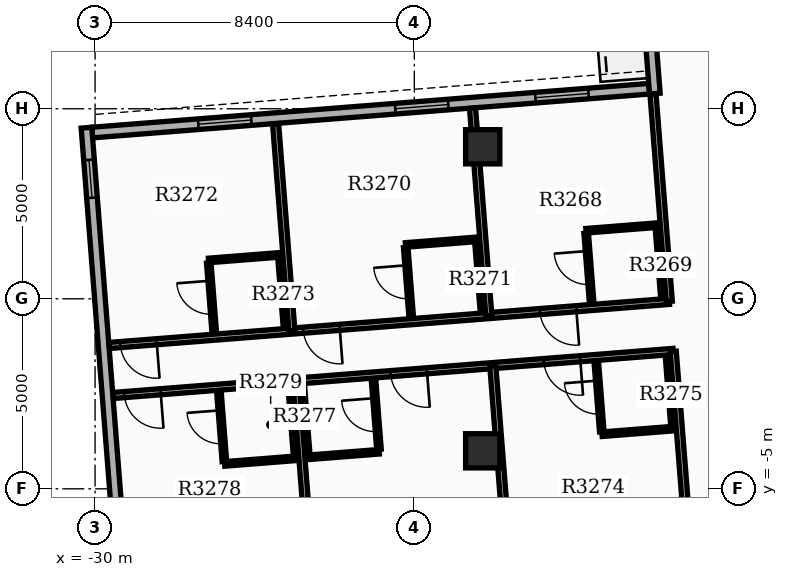
"""IFC4 building model, lengths in metres.
Left out: names, types, materials, properties, quantities, classifications, styles, units other than length and angle.
Written with IfcOpenShell. Run it as: python <this file> out.ifc"""

import sys

from ifc_helpers import new_model, si_unit, direction, frame, frame_2d, origin, origin_2d, place, context, subcontext, project, spatial, rectangle, extrude, element, fill, save


model = new_model("IFC4")
c1 = context("Model", 3, precision=1e-05, world=origin(), true_north=direction((0.0, 1.0)))
c2 = subcontext(c1, "Body", "Model", "MODEL_VIEW")
j1 = project(units=[si_unit("LENGTHUNIT", "METRE"), si_unit("PLANEANGLEUNIT", "RADIAN")], contexts=[c1])
p1 = place(None, origin())
s1 = spatial("IfcSite", under=j1, at=p1, CompositionType="ELEMENT")
p2 = place(p1, origin())
s2 = spatial("IfcBuilding", under=s1, at=p2, CompositionType="ELEMENT")
p3 = place(p2, frame((0.0, 0.0, 205.2)))
s3 = spatial("IfcBuildingStorey", under=s2, at=p3, CompositionType="ELEMENT", Elevation=205.2)
for number, where, z_axis, x_axis in (
    (1, (-19.8, -4.0, 0.0), (0.0, 0.0, 1.0), (1.0, 0.0, 0.0)),
    (2, (-19.8, 4.0, 0.0), (0.0, 0.0, 1.0), (1.0, 0.0, 0.0)),
):
    element("IfcColumn", number, at=place(p3, frame(where, z_axis=z_axis, x_axis=x_axis)), inside=s3, PredefinedType="COLUMN", context=c2, shape_type="SweptSolid", body=[
        extrude(rectangle(XDim=0.9, YDim=0.9, at=origin_2d()), origin(), (0.0, 0.0, 1.0), 3.9),
    ])
p4 = place(p3, frame((-15.421, 5.527, 0.0), z_axis=(0.0, 0.0, 1.0), x_axis=(-0.996917526837, -0.078456642068, 0.0)))
e3 = element("IfcWall", 3, at=p4, inside=s3, PredefinedType="STANDARD", context=c2, shape_type="SweptSolid", body=[
    extrude(rectangle(XDim=14.7, YDim=0.28, at=frame_2d((7.35, 0.0))), origin(), (0.0, 0.0, 1.0), 3.18),
])
p5 = place(p4, frame((1.6, 0.0, 0.8)))
e4 = element("IfcOpeningElement", 4, at=p5, cuts=e3, PredefinedType="OPENING", context=c2, shape_type="SweptSolid", body=[
    extrude(rectangle(XDim=1.4, YDim=1.6, at=frame_2d((0.7, 0.8))), frame((0.0, 0.15, 0.0), z_axis=(0.0, -1.0, 0.0), x_axis=(1.0, 0.0, 0.0)), (0.0, 0.0, 1.0), 0.3),
])
p6 = place(p4, frame((5.3, 0.0, 0.8)))
e5 = element("IfcOpeningElement", 5, at=p6, cuts=e3, PredefinedType="OPENING", context=c2, shape_type="SweptSolid", body=[
    extrude(rectangle(XDim=1.4, YDim=1.6, at=frame_2d((0.7, 0.8))), frame((0.0, 0.15, 0.0), z_axis=(0.0, -1.0, 0.0), x_axis=(1.0, 0.0, 0.0)), (0.0, 0.0, 1.0), 0.3),
])
p7 = place(p4, frame((10.5, 0.0, 0.8)))
e6 = element("IfcOpeningElement", 6, at=p7, cuts=e3, PredefinedType="OPENING", context=c2, shape_type="SweptSolid", body=[
    extrude(rectangle(XDim=1.4, YDim=1.6, at=frame_2d((0.7, 0.8))), frame((0.0, 0.15, 0.0), z_axis=(0.0, -1.0, 0.0), x_axis=(1.0, 0.0, 0.0)), (0.0, 0.0, 1.0), 0.3),
])
p8 = place(p3, frame((-30.226, 4.502, 0.0), z_axis=(0.0, 0.0, 1.0), x_axis=(0.078457226018, -0.996917480881, 0.0)))
e7 = element("IfcWall", 7, at=p8, inside=s3, PredefinedType="STANDARD", context=c2, shape_type="SweptSolid", body=[
    extrude(rectangle(XDim=13.72, YDim=0.28, at=frame_2d((6.86, 0.0))), origin(), (0.0, 0.0, 1.0), 3.18),
])
p9 = place(p8, frame((0.85, 0.0, 0.85)))
e8 = element("IfcOpeningElement", 8, at=p9, cuts=e7, PredefinedType="OPENING", context=c2, shape_type="SweptSolid", body=[
    extrude(rectangle(XDim=1.0, YDim=1.5, at=frame_2d((0.5, 0.75))), frame((0.0, 0.15, 0.0), z_axis=(0.0, -1.0, 0.0), x_axis=(1.0, 0.0, 0.0)), (0.0, 0.0, 1.0), 0.3),
])
p10 = place(p3, frame((-15.271, 5.398, 0.0), z_axis=(0.0, 0.0, 1.0), x_axis=(-0.078473519122, 0.996916198482, 0.0)))
e9 = element("IfcWall", 9, at=p10, inside=s3, PredefinedType="STANDARD", context=c2, shape_type="SweptSolid", body=[
    extrude(rectangle(XDim=6.86, YDim=0.28, at=frame_2d((3.43, 0.0))), origin(), (0.0, 0.0, 1.0), 3.18),
])
p11 = place(p3, frame((-14.89, -0.069, 0.0), z_axis=(0.0, 0.0, 1.0), x_axis=(-0.996917997344, -0.078450663299, 0.0)))
e10 = element("IfcWall", 10, at=p11, inside=s3, PredefinedType="PARTITIONING", context=c2, shape_type="SweptSolid", body=[
    extrude(rectangle(XDim=14.782, YDim=0.16, at=frame_2d((7.391, 0.0))), origin(), (0.0, 0.0, 1.0), 3.17),
])
p12 = place(p11, frame((2.456, 0.0, 0.0)))
e11 = element("IfcOpeningElement", 11, at=p12, cuts=e10, PredefinedType="OPENING", context=c2, shape_type="SweptSolid", body=[
    extrude(rectangle(XDim=0.96, YDim=2.15, at=frame_2d((0.48, 1.075))), frame((0.0, 0.09, 0.0), z_axis=(0.0, -1.0, 0.0), x_axis=(1.0, 0.0, 0.0)), (0.0, 0.0, 1.0), 0.18),
])
p13 = place(p11, frame((8.701, 0.0, 0.0)))
e12 = element("IfcOpeningElement", 12, at=p13, cuts=e10, PredefinedType="OPENING", context=c2, shape_type="SweptSolid", body=[
    extrude(rectangle(XDim=0.96, YDim=2.15, at=frame_2d((0.48, 1.075))), frame((0.0, 0.09, 0.0), z_axis=(0.0, -1.0, 0.0), x_axis=(1.0, 0.0, 0.0)), (0.0, 0.0, 1.0), 0.18),
])
p14 = place(p11, frame((13.53, 0.0, 0.0)))
e13 = element("IfcOpeningElement", 13, at=p14, cuts=e10, PredefinedType="OPENING", context=c2, shape_type="SweptSolid", body=[
    extrude(rectangle(XDim=0.96, YDim=2.15, at=frame_2d((0.48, 1.075))), frame((0.0, 0.09, 0.0), z_axis=(0.0, -1.0, 0.0), x_axis=(1.0, 0.0, 0.0)), (0.0, 0.0, 1.0), 0.18),
])
p15 = place(p3, frame((-14.89, -0.069, 0.0), z_axis=(0.0, 0.0, 1.0), x_axis=(-0.078477291154, 0.996915901555, 0.0)))
e14 = element("IfcWall", 14, at=p15, inside=s3, PredefinedType="PARTITIONING", context=c2, shape_type="SweptSolid", body=[
    extrude(rectangle(XDim=5.472, YDim=0.16, at=frame_2d((2.736, 0.0))), origin(), (0.0, 0.0, 1.0), 3.17),
])
p16 = place(p3, frame((-19.639, -0.442, 0.0), z_axis=(0.0, 0.0, 1.0), x_axis=(-0.078436439621, 0.996919116548, 0.0)))
e15 = element("IfcWall", 15, at=p16, inside=s3, PredefinedType="PARTITIONING", context=c2, shape_type="SweptSolid", body=[
    extrude(rectangle(XDim=5.472, YDim=0.16, at=frame_2d((2.736, 0.0))), origin(), (0.0, 0.0, 1.0), 3.17),
])
p17 = place(p3, frame((-16.935, -0.089, 0.0), z_axis=(0.0, 0.0, 1.0), x_axis=(-0.078337634704, 0.996926885478, 0.0)))
e16 = element("IfcWall", 16, at=p17, inside=s3, PredefinedType="PARTITIONING", context=c2, shape_type="SweptSolid", body=[
    extrude(rectangle(XDim=1.82, YDim=0.12, at=frame_2d((0.91, 0.0))), origin(), (0.0, 0.0, 1.0), 3.17),
])
p18 = place(p17, frame((0.47, 0.0, 0.0)))
e17 = element("IfcOpeningElement", 17, at=p18, cuts=e16, PredefinedType="OPENING", context=c2, shape_type="SweptSolid", body=[
    extrude(rectangle(XDim=0.88, YDim=2.1, at=frame_2d((0.44, 1.05))), frame((0.0, 0.07, 0.0), z_axis=(0.0, -1.0, 0.0), x_axis=(1.0, 0.0, 0.0)), (0.0, 0.0, 1.0), 0.14),
])
p19 = place(p3, frame((-15.061, 0.059, 0.0), z_axis=(0.0, 0.0, 1.0), x_axis=(-0.078481444107, 0.996915574626, 0.0)))
e18 = element("IfcWall", 18, at=p19, inside=s3, PredefinedType="PARTITIONING", context=c2, shape_type="SweptSolid", body=[
    extrude(rectangle(XDim=1.82, YDim=0.12, at=frame_2d((0.91, 0.0))), origin(), (0.0, 0.0, 1.0), 3.17),
])
p20 = place(p3, frame((-15.209, 1.938, 0.0), z_axis=(0.0, 0.0, 1.0), x_axis=(-0.99691849475, -0.078444342213, 0.0)))
e19 = element("IfcWall", 19, at=p20, inside=s3, PredefinedType="PARTITIONING", context=c2, shape_type="SweptSolid", body=[
    extrude(rectangle(XDim=1.88, YDim=0.12, at=frame_2d((0.94, 0.0))), origin(), (0.0, 0.0, 1.0), 3.17),
])
p21 = place(p3, frame((-24.821, -0.85, 0.0), z_axis=(0.0, 0.0, 1.0), x_axis=(-0.078480781753, 0.996915626769, 0.0)))
e20 = element("IfcWall", 20, at=p21, inside=s3, PredefinedType="PARTITIONING", context=c2, shape_type="SweptSolid", body=[
    extrude(rectangle(XDim=5.472, YDim=0.16, at=frame_2d((2.736, 0.0))), origin(), (0.0, 0.0, 1.0), 3.17),
])
p22 = place(p3, frame((-21.684, -0.463, 0.0), z_axis=(0.0, 0.0, 1.0), x_axis=(-0.0784709492, 0.996916400774, 0.0)))
e21 = element("IfcWall", 21, at=p22, inside=s3, PredefinedType="PARTITIONING", context=c2, shape_type="SweptSolid", body=[
    extrude(rectangle(XDim=1.82, YDim=0.12, at=frame_2d((0.91, 0.0))), origin(), (0.0, 0.0, 1.0), 3.17),
])
p23 = place(p22, frame((0.47, 0.0, 0.0)))
e22 = element("IfcOpeningElement", 22, at=p23, cuts=e21, PredefinedType="OPENING", context=c2, shape_type="SweptSolid", body=[
    extrude(rectangle(XDim=0.88, YDim=2.1, at=frame_2d((0.44, 1.05))), frame((0.0, 0.07, 0.0), z_axis=(0.0, -1.0, 0.0), x_axis=(1.0, 0.0, 0.0)), (0.0, 0.0, 1.0), 0.14),
])
p24 = place(p3, frame((-19.809, -0.315, 0.0), z_axis=(0.0, 0.0, 1.0), x_axis=(-0.0784709492, 0.996916400774, 0.0)))
e23 = element("IfcWall", 23, at=p24, inside=s3, PredefinedType="PARTITIONING", context=c2, shape_type="SweptSolid", body=[
    extrude(rectangle(XDim=1.82, YDim=0.12, at=frame_2d((0.91, 0.0))), origin(), (0.0, 0.0, 1.0), 3.17),
])
p25 = place(p3, frame((-19.957, 1.564, 0.0), z_axis=(0.0, 0.0, 1.0), x_axis=(-0.99691849475, -0.078444342213, 0.0)))
e24 = element("IfcWall", 24, at=p25, inside=s3, PredefinedType="PARTITIONING", context=c2, shape_type="SweptSolid", body=[
    extrude(rectangle(XDim=1.88, YDim=0.12, at=frame_2d((0.94, 0.0))), origin(), (0.0, 0.0, 1.0), 3.17),
])
p26 = place(p3, frame((-26.865, -0.871, 0.0), z_axis=(0.0, 0.0, 1.0), x_axis=(-0.0784709492, 0.996916400774, 0.0)))
e25 = element("IfcWall", 25, at=p26, inside=s3, PredefinedType="PARTITIONING", context=c2, shape_type="SweptSolid", body=[
    extrude(rectangle(XDim=1.82, YDim=0.12, at=frame_2d((0.91, 0.0))), origin(), (0.0, 0.0, 1.0), 3.17),
])
p27 = place(p26, frame((0.47, 0.0, 0.0)))
e26 = element("IfcOpeningElement", 26, at=p27, cuts=e25, PredefinedType="OPENING", context=c2, shape_type="SweptSolid", body=[
    extrude(rectangle(XDim=0.88, YDim=2.1, at=frame_2d((0.44, 1.05))), frame((0.0, 0.07, 0.0), z_axis=(0.0, -1.0, 0.0), x_axis=(1.0, 0.0, 0.0)), (0.0, 0.0, 1.0), 0.14),
])
p28 = place(p3, frame((-24.991, -0.723, 0.0), z_axis=(0.0, 0.0, 1.0), x_axis=(-0.078481444107, 0.996915574626, 0.0)))
e27 = element("IfcWall", 27, at=p28, inside=s3, PredefinedType="PARTITIONING", context=c2, shape_type="SweptSolid", body=[
    extrude(rectangle(XDim=1.82, YDim=0.12, at=frame_2d((0.91, 0.0))), origin(), (0.0, 0.0, 1.0), 3.17),
])
p29 = place(p3, frame((-25.139, 1.156, 0.0), z_axis=(0.0, 0.0, 1.0), x_axis=(-0.996919293781, -0.07843418698, 0.0)))
e28 = element("IfcWall", 28, at=p29, inside=s3, PredefinedType="PARTITIONING", context=c2, shape_type="SweptSolid", body=[
    extrude(rectangle(XDim=1.88, YDim=0.12, at=frame_2d((0.94, 0.0))), origin(), (0.0, 0.0, 1.0), 3.17),
])
p30 = place(p3, frame((-14.787, -1.385, 0.0), z_axis=(0.0, 0.0, 1.0), x_axis=(-0.996917895694, -0.078451955012, 0.0)))
e29 = element("IfcWall", 29, at=p30, inside=s3, PredefinedType="PARTITIONING", context=c2, shape_type="SweptSolid", body=[
    extrude(rectangle(XDim=14.782, YDim=0.16, at=frame_2d((7.391, 0.0))), origin(), (0.0, 0.0, 1.0), 3.17),
])
p31 = place(p30, frame((2.456, 0.0, 0.0)))
e30 = element("IfcOpeningElement", 30, at=p31, cuts=e29, PredefinedType="OPENING", context=c2, shape_type="SweptSolid", body=[
    extrude(rectangle(XDim=0.96, YDim=2.15, at=frame_2d((0.48, 1.075))), frame((0.0, 0.09, 0.0), z_axis=(0.0, -1.0, 0.0), x_axis=(1.0, 0.0, 0.0)), (0.0, 0.0, 1.0), 0.18),
])
p32 = place(p30, frame((6.501, 0.0, 0.0)))
e31 = element("IfcOpeningElement", 31, at=p32, cuts=e29, PredefinedType="OPENING", context=c2, shape_type="SweptSolid", body=[
    extrude(rectangle(XDim=0.96, YDim=2.15, at=frame_2d((0.48, 1.075))), frame((0.0, 0.09, 0.0), z_axis=(0.0, -1.0, 0.0), x_axis=(1.0, 0.0, 0.0)), (0.0, 0.0, 1.0), 0.18),
])
p33 = place(p30, frame((13.53, 0.0, 0.0)))
e32 = element("IfcOpeningElement", 32, at=p33, cuts=e29, PredefinedType="OPENING", context=c2, shape_type="SweptSolid", body=[
    extrude(rectangle(XDim=0.96, YDim=2.15, at=frame_2d((0.48, 1.075))), frame((0.0, 0.09, 0.0), z_axis=(0.0, -1.0, 0.0), x_axis=(1.0, 0.0, 0.0)), (0.0, 0.0, 1.0), 0.18),
])
p34 = place(p3, frame((-14.787, -1.385, 0.0), z_axis=(0.0, 0.0, 1.0), x_axis=(0.078486363594, -0.99691518733, 0.0)))
e33 = element("IfcWall", 33, at=p34, inside=s3, PredefinedType="PARTITIONING", context=c2, shape_type="SweptSolid", body=[
    extrude(rectangle(XDim=6.352, YDim=0.16, at=frame_2d((3.176, 0.0))), origin(), (0.0, 0.0, 1.0), 3.17),
])
p35 = place(p3, frame((-19.535, -1.758, 0.0), z_axis=(0.0, 0.0, 1.0), x_axis=(0.078483356311, -0.996915424087, 0.0)))
e34 = element("IfcWall", 34, at=p35, inside=s3, PredefinedType="PARTITIONING", context=c2, shape_type="SweptSolid", body=[
    extrude(rectangle(XDim=6.352, YDim=0.16, at=frame_2d((3.176, 0.0))), origin(), (0.0, 0.0, 1.0), 3.17),
])
p36 = place(p3, frame((-16.667, -3.499, 0.0), z_axis=(0.0, 0.0, 1.0), x_axis=(-0.0784709492, 0.996916400774, 0.0)))
e35 = element("IfcWall", 35, at=p36, inside=s3, PredefinedType="PARTITIONING", context=c2, shape_type="SweptSolid", body=[
    extrude(rectangle(XDim=1.82, YDim=0.12, at=frame_2d((0.91, 0.0))), origin(), (0.0, 0.0, 1.0), 3.17),
])
p37 = place(p36, frame((0.47, 0.0, 0.0)))
e36 = element("IfcOpeningElement", 36, at=p37, cuts=e35, PredefinedType="OPENING", context=c2, shape_type="SweptSolid", body=[
    extrude(rectangle(XDim=0.88, YDim=2.1, at=frame_2d((0.44, 1.05))), frame((0.0, 0.07, 0.0), z_axis=(0.0, -1.0, 0.0), x_axis=(1.0, 0.0, 0.0)), (0.0, 0.0, 1.0), 0.14),
])
p38 = place(p3, frame((-14.793, -3.351, 0.0), z_axis=(0.0, 0.0, 1.0), x_axis=(-0.0784709492, 0.996916400774, 0.0)))
e37 = element("IfcWall", 37, at=p38, inside=s3, PredefinedType="PARTITIONING", context=c2, shape_type="SweptSolid", body=[
    extrude(rectangle(XDim=1.82, YDim=0.12, at=frame_2d((0.91, 0.0))), origin(), (0.0, 0.0, 1.0), 3.17),
])
p39 = place(p3, frame((-14.788, -3.416, 0.0), z_axis=(0.0, 0.0, 1.0), x_axis=(-0.996919293781, -0.07843418698, 0.0)))
e38 = element("IfcWall", 38, at=p39, inside=s3, PredefinedType="PARTITIONING", context=c2, shape_type="SweptSolid", body=[
    extrude(rectangle(XDim=1.88, YDim=0.12, at=frame_2d((0.94, 0.0))), origin(), (0.0, 0.0, 1.0), 3.17),
])
p40 = place(p3, frame((-24.717, -2.166, 0.0), z_axis=(0.0, 0.0, 1.0), x_axis=(0.078448164166, -0.996918194005, 0.0)))
e39 = element("IfcWall", 39, at=p40, inside=s3, PredefinedType="PARTITIONING", context=c2, shape_type="SweptSolid", body=[
    extrude(rectangle(XDim=6.352, YDim=0.16, at=frame_2d((3.176, 0.0))), origin(), (0.0, 0.0, 1.0), 3.17),
])
p41 = place(p3, frame((-22.53, -3.96, 0.0), z_axis=(0.0, 0.0, 1.0), x_axis=(-0.0784709492, 0.996916400774, 0.0)))
e40 = element("IfcWall", 40, at=p41, inside=s3, PredefinedType="PARTITIONING", context=c2, shape_type="SweptSolid", body=[
    extrude(rectangle(XDim=1.82, YDim=0.12, at=frame_2d((0.91, 0.0))), origin(), (0.0, 0.0, 1.0), 3.17),
])
p42 = place(p41, frame((0.47, 0.0, 0.0)))
e41 = element("IfcOpeningElement", 41, at=p42, cuts=e40, PredefinedType="OPENING", context=c2, shape_type="SweptSolid", body=[
    extrude(rectangle(XDim=0.88, YDim=2.1, at=frame_2d((0.44, 1.05))), frame((0.0, 0.07, 0.0), z_axis=(0.0, -1.0, 0.0), x_axis=(1.0, 0.0, 0.0)), (0.0, 0.0, 1.0), 0.14),
])
p43 = place(p3, frame((-24.404, -4.107, 0.0), z_axis=(0.0, 0.0, 1.0), x_axis=(-0.0784709492, 0.996916400774, 0.0)))
e42 = element("IfcWall", 42, at=p43, inside=s3, PredefinedType="PARTITIONING", context=c2, shape_type="SweptSolid", body=[
    extrude(rectangle(XDim=1.82, YDim=0.12, at=frame_2d((0.91, 0.0))), origin(), (0.0, 0.0, 1.0), 3.17),
])
p44 = place(p3, frame((-22.525, -4.025, 0.0), z_axis=(0.0, 0.0, 1.0), x_axis=(-0.996919293781, -0.07843418698, 0.0)))
e43 = element("IfcWall", 43, at=p44, inside=s3, PredefinedType="PARTITIONING", context=c2, shape_type="SweptSolid", body=[
    extrude(rectangle(XDim=1.88, YDim=0.12, at=frame_2d((0.94, 0.0))), origin(), (0.0, 0.0, 1.0), 3.17),
])
p45 = place(p3, frame((-26.597, -4.28, 0.0), z_axis=(0.0, 0.0, 1.0), x_axis=(-0.0784709492, 0.996916400774, 0.0)))
e44 = element("IfcWall", 44, at=p45, inside=s3, PredefinedType="PARTITIONING", context=c2, shape_type="SweptSolid", body=[
    extrude(rectangle(XDim=1.82, YDim=0.12, at=frame_2d((0.91, 0.0))), origin(), (0.0, 0.0, 1.0), 3.17),
])
p46 = place(p45, frame((0.47, 0.0, 0.0)))
e45 = element("IfcOpeningElement", 45, at=p46, cuts=e44, PredefinedType="OPENING", context=c2, shape_type="SweptSolid", body=[
    extrude(rectangle(XDim=0.88, YDim=2.1, at=frame_2d((0.44, 1.05))), frame((0.0, 0.07, 0.0), z_axis=(0.0, -1.0, 0.0), x_axis=(1.0, 0.0, 0.0)), (0.0, 0.0, 1.0), 0.14),
])
p47 = place(p3, frame((-24.723, -4.133, 0.0), z_axis=(0.0, 0.0, 1.0), x_axis=(-0.0784709492, 0.996916400774, 0.0)))
e46 = element("IfcWall", 46, at=p47, inside=s3, PredefinedType="PARTITIONING", context=c2, shape_type="SweptSolid", body=[
    extrude(rectangle(XDim=1.82, YDim=0.12, at=frame_2d((0.91, 0.0))), origin(), (0.0, 0.0, 1.0), 3.17),
])
p48 = place(p3, frame((-24.718, -4.197, 0.0), z_axis=(0.0, 0.0, 1.0), x_axis=(-0.99691849475, -0.078444342213, 0.0)))
e47 = element("IfcWall", 47, at=p48, inside=s3, PredefinedType="PARTITIONING", context=c2, shape_type="SweptSolid", body=[
    extrude(rectangle(XDim=1.88, YDim=0.12, at=frame_2d((0.94, 0.0))), origin(), (0.0, 0.0, 1.0), 3.17),
])
p49 = place(p5, origin())
e48 = element("IfcWindow", 48, at=p49, inside=s3, PartitioningType="SINGLE_PANEL", PredefinedType="WINDOW", context=c2, shape_type="SweptSolid", body=[
    extrude(rectangle(XDim=1.4, YDim=1.6, at=frame_2d((0.7, 0.8))), frame((0.0, 0.03, 0.0), z_axis=(0.0, -1.0, 0.0), x_axis=(1.0, 0.0, 0.0)), (0.0, 0.0, 1.0), 0.06),
])
fill(e4, e48)
p50 = place(p6, origin())
e49 = element("IfcWindow", 49, at=p50, inside=s3, PartitioningType="SINGLE_PANEL", PredefinedType="WINDOW", context=c2, shape_type="SweptSolid", body=[
    extrude(rectangle(XDim=1.4, YDim=1.6, at=frame_2d((0.7, 0.8))), frame((0.0, 0.03, 0.0), z_axis=(0.0, -1.0, 0.0), x_axis=(1.0, 0.0, 0.0)), (0.0, 0.0, 1.0), 0.06),
])
fill(e5, e49)
p51 = place(p7, origin())
e50 = element("IfcWindow", 50, at=p51, inside=s3, PartitioningType="SINGLE_PANEL", PredefinedType="WINDOW", context=c2, shape_type="SweptSolid", body=[
    extrude(rectangle(XDim=1.4, YDim=1.6, at=frame_2d((0.7, 0.8))), frame((0.0, 0.03, 0.0), z_axis=(0.0, -1.0, 0.0), x_axis=(1.0, 0.0, 0.0)), (0.0, 0.0, 1.0), 0.06),
])
fill(e6, e50)
p52 = place(p9, origin())
e51 = element("IfcWindow", 51, at=p52, inside=s3, PartitioningType="SINGLE_PANEL", PredefinedType="WINDOW", context=c2, shape_type="SweptSolid", body=[
    extrude(rectangle(XDim=1.0, YDim=1.5, at=frame_2d((0.5, 0.75))), frame((0.0, 0.03, 0.0), z_axis=(0.0, -1.0, 0.0), x_axis=(1.0, 0.0, 0.0)), (0.0, 0.0, 1.0), 0.06),
])
fill(e8, e51)
p53 = place(p12, origin())
e52 = element("IfcDoor", 52, at=p53, inside=s3, OperationType="SINGLE_SWING_LEFT", PredefinedType="DOOR", context=c2, shape_type="SweptSolid", body=[
    extrude(rectangle(XDim=0.96, YDim=2.15, at=frame_2d((0.48, 1.075))), frame((0.0, 0.025, 0.0), z_axis=(0.0, -1.0, 0.0), x_axis=(1.0, 0.0, 0.0)), (0.0, 0.0, 1.0), 0.05),
])
fill(e11, e52)
p54 = place(p18, origin())
e53 = element("IfcDoor", 53, at=p54, inside=s3, OperationType="SINGLE_SWING_RIGHT", PredefinedType="DOOR", context=c2, shape_type="SweptSolid", body=[
    extrude(rectangle(XDim=0.88, YDim=2.1, at=frame_2d((0.44, 1.05))), frame((0.0, 0.025, 0.0), z_axis=(0.0, -1.0, 0.0), x_axis=(1.0, 0.0, 0.0)), (0.0, 0.0, 1.0), 0.05),
])
fill(e17, e53)
p55 = place(p13, origin())
e54 = element("IfcDoor", 54, at=p55, inside=s3, OperationType="SINGLE_SWING_LEFT", PredefinedType="DOOR", context=c2, shape_type="SweptSolid", body=[
    extrude(rectangle(XDim=0.96, YDim=2.15, at=frame_2d((0.48, 1.075))), frame((0.0, 0.025, 0.0), z_axis=(0.0, -1.0, 0.0), x_axis=(1.0, 0.0, 0.0)), (0.0, 0.0, 1.0), 0.05),
])
fill(e12, e54)
p56 = place(p23, origin())
e55 = element("IfcDoor", 55, at=p56, inside=s3, OperationType="SINGLE_SWING_RIGHT", PredefinedType="DOOR", context=c2, shape_type="SweptSolid", body=[
    extrude(rectangle(XDim=0.88, YDim=2.1, at=frame_2d((0.44, 1.05))), frame((0.0, 0.025, 0.0), z_axis=(0.0, -1.0, 0.0), x_axis=(1.0, 0.0, 0.0)), (0.0, 0.0, 1.0), 0.05),
])
fill(e22, e55)
p57 = place(p14, origin())
e56 = element("IfcDoor", 56, at=p57, inside=s3, OperationType="SINGLE_SWING_LEFT", PredefinedType="DOOR", context=c2, shape_type="SweptSolid", body=[
    extrude(rectangle(XDim=0.96, YDim=2.15, at=frame_2d((0.48, 1.075))), frame((0.0, 0.025, 0.0), z_axis=(0.0, -1.0, 0.0), x_axis=(1.0, 0.0, 0.0)), (0.0, 0.0, 1.0), 0.05),
])
fill(e13, e56)
p58 = place(p27, origin())
e57 = element("IfcDoor", 57, at=p58, inside=s3, OperationType="SINGLE_SWING_RIGHT", PredefinedType="DOOR", context=c2, shape_type="SweptSolid", body=[
    extrude(rectangle(XDim=0.88, YDim=2.1, at=frame_2d((0.44, 1.05))), frame((0.0, 0.025, 0.0), z_axis=(0.0, -1.0, 0.0), x_axis=(1.0, 0.0, 0.0)), (0.0, 0.0, 1.0), 0.05),
])
fill(e26, e57)
p59 = place(p31, origin())
e58 = element("IfcDoor", 58, at=p59, inside=s3, OperationType="SINGLE_SWING_LEFT", PredefinedType="DOOR", context=c2, shape_type="SweptSolid", body=[
    extrude(rectangle(XDim=0.96, YDim=2.15, at=frame_2d((0.48, 1.075))), frame((0.0, 0.025, 0.0), z_axis=(0.0, -1.0, 0.0), x_axis=(1.0, 0.0, 0.0)), (0.0, 0.0, 1.0), 0.05),
])
fill(e30, e58)
p60 = place(p37, origin())
e59 = element("IfcDoor", 59, at=p60, inside=s3, OperationType="SINGLE_SWING_RIGHT", PredefinedType="DOOR", context=c2, shape_type="SweptSolid", body=[
    extrude(rectangle(XDim=0.88, YDim=2.1, at=frame_2d((0.44, 1.05))), frame((0.0, 0.025, 0.0), z_axis=(0.0, -1.0, 0.0), x_axis=(1.0, 0.0, 0.0)), (0.0, 0.0, 1.0), 0.05),
])
fill(e36, e59)
p61 = place(p32, origin())
e60 = element("IfcDoor", 60, at=p61, inside=s3, OperationType="SINGLE_SWING_LEFT", PredefinedType="DOOR", context=c2, shape_type="SweptSolid", body=[
    extrude(rectangle(XDim=0.96, YDim=2.15, at=frame_2d((0.48, 1.075))), frame((0.0, 0.025, 0.0), z_axis=(0.0, -1.0, 0.0), x_axis=(1.0, 0.0, 0.0)), (0.0, 0.0, 1.0), 0.05),
])
fill(e31, e60)
p62 = place(p42, origin())
e61 = element("IfcDoor", 61, at=p62, inside=s3, OperationType="SINGLE_SWING_RIGHT", PredefinedType="DOOR", context=c2, shape_type="SweptSolid", body=[
    extrude(rectangle(XDim=0.88, YDim=2.1, at=frame_2d((0.44, 1.05))), frame((0.0, 0.025, 0.0), z_axis=(0.0, -1.0, 0.0), x_axis=(1.0, 0.0, 0.0)), (0.0, 0.0, 1.0), 0.05),
])
fill(e41, e61)
p63 = place(p33, origin())
e62 = element("IfcDoor", 62, at=p63, inside=s3, OperationType="SINGLE_SWING_LEFT", PredefinedType="DOOR", context=c2, shape_type="SweptSolid", body=[
    extrude(rectangle(XDim=0.96, YDim=2.15, at=frame_2d((0.48, 1.075))), frame((0.0, 0.025, 0.0), z_axis=(0.0, -1.0, 0.0), x_axis=(1.0, 0.0, 0.0)), (0.0, 0.0, 1.0), 0.05),
])
fill(e32, e62)
p64 = place(p46, origin())
e63 = element("IfcDoor", 63, at=p64, inside=s3, OperationType="SINGLE_SWING_RIGHT", PredefinedType="DOOR", context=c2, shape_type="SweptSolid", body=[
    extrude(rectangle(XDim=0.88, YDim=2.1, at=frame_2d((0.44, 1.05))), frame((0.0, 0.025, 0.0), z_axis=(0.0, -1.0, 0.0), x_axis=(1.0, 0.0, 0.0)), (0.0, 0.0, 1.0), 0.05),
])
fill(e45, e63)
save(model, sys.argv[1])
